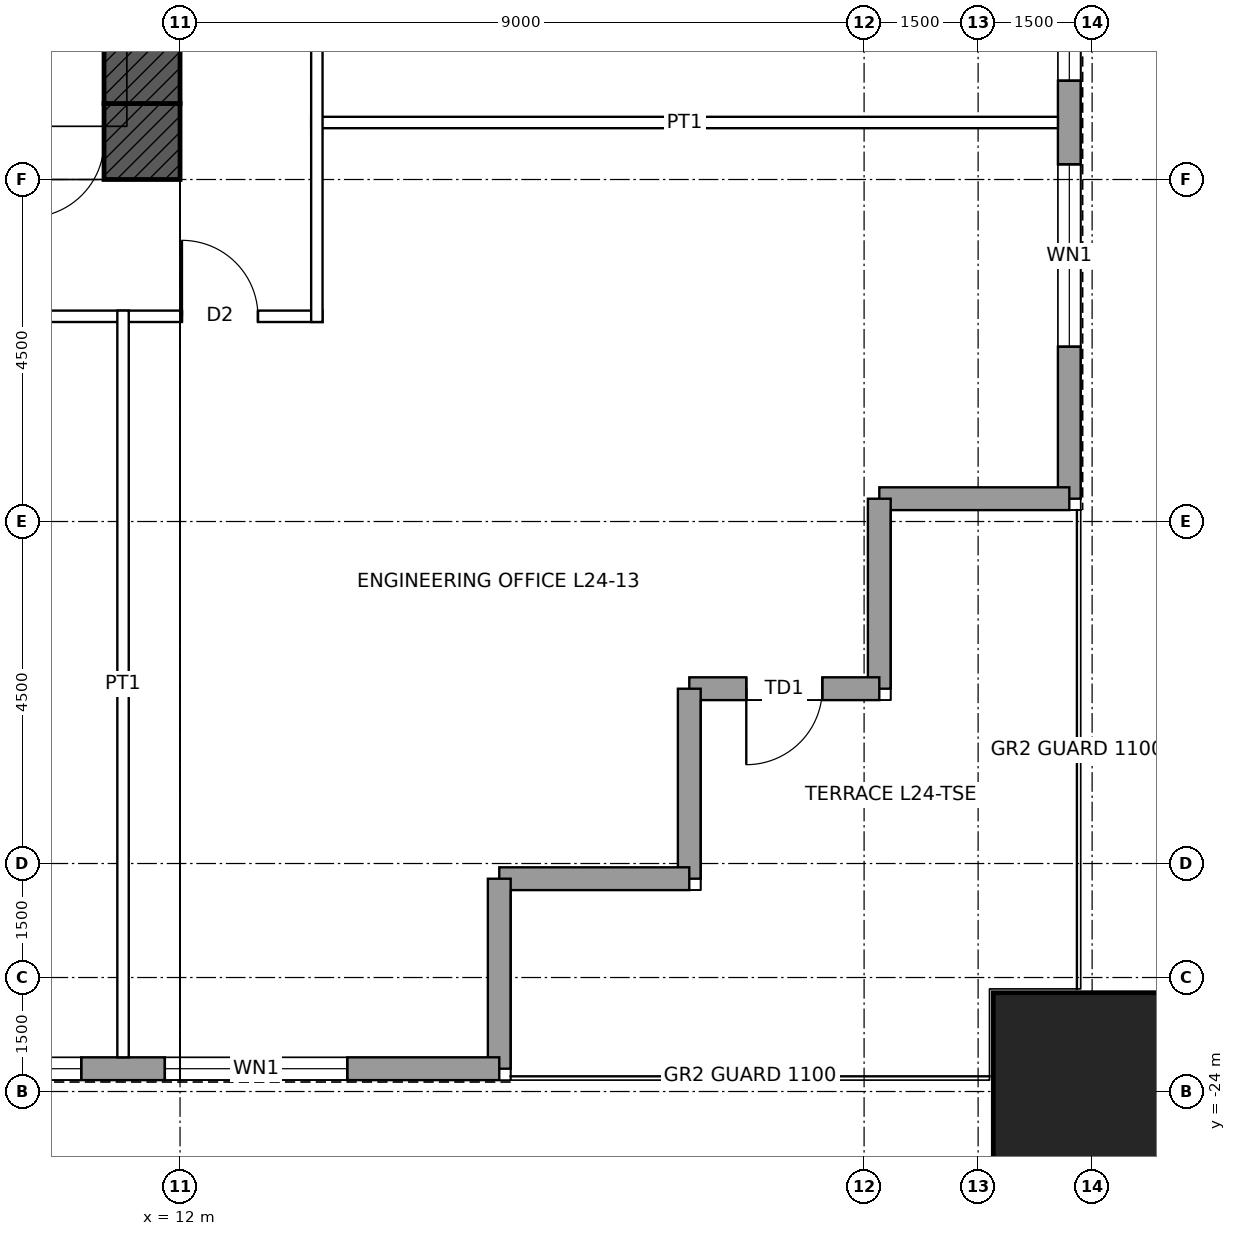
"""IFC4 building model, lengths in metres.
Left out: names, types, materials, properties, quantities, classifications, styles, units other than length and angle.
Written with IfcOpenShell. Run it as: python <this file> out.ifc"""

import sys

from ifc_helpers import new_model, si_unit, direction, frame, frame_2d, origin, origin_2d, place, context, subcontext, project, spatial, rectangle, hollow_rectangle, extrude, element, fill, save


model = new_model("IFC4")
c1 = context("Model", 3, precision=1e-05, world=origin(), true_north=direction((0.0, 1.0)))
c2 = subcontext(c1, "Body", "Model", "MODEL_VIEW")
j1 = project(units=[si_unit("LENGTHUNIT", "METRE"), si_unit("PLANEANGLEUNIT", "RADIAN")], contexts=[c1])
p1 = place(None, origin())
s1 = spatial("IfcSite", under=j1, at=p1, CompositionType="ELEMENT")
p2 = place(p1, origin())
s2 = spatial("IfcBuilding", under=s1, at=p2, CompositionType="ELEMENT")
p3 = place(p2, frame((0.0, 0.0, 122.4)))
s3 = spatial("IfcBuildingStorey", under=s2, at=p3, CompositionType="ELEMENT", Elevation=122.4)
p4 = place(p3, frame((24.0, -24.0, 0.0), z_axis=(0.0, 0.0, 1.0), x_axis=(1.0, 0.0, 0.0)))
e1 = element("IfcColumn", 1, at=p4, inside=s3, PredefinedType="COLUMN", context=c2, shape_type="SweptSolid", body=[
    extrude(hollow_rectangle(XDim=2.6, YDim=2.6, WallThickness=0.13, at=origin_2d()), origin(), (0.0, 0.0, 1.0), 4.5),
])
p5 = place(p3, frame((12.0, -11.5, 0.0), z_axis=(0.0, 0.0, 1.0), x_axis=(-1.0, 0.0, 0.0)))
e2 = element("IfcWall", 2, at=p5, inside=s3, PredefinedType="SHEAR", context=c2, shape_type="SweptSolid", body=[
    extrude(rectangle(XDim=24.0, YDim=1.0, at=frame_2d((12.0, 0.0))), origin(), (0.0, 0.0, 1.0), 4.5),
])
p6 = place(p5, frame((11.5, 0.0, 0.0)))
e3 = element("IfcOpeningElement", 3, at=p6, cuts=e2, PredefinedType="OPENING", context=c2, shape_type="SweptSolid", body=[
    extrude(rectangle(XDim=1.0, YDim=2.1, at=frame_2d((0.5, 1.05))), frame((0.0, 0.51, 0.0), z_axis=(0.0, -1.0, 0.0), x_axis=(1.0, 0.0, 0.0)), (0.0, 0.0, 1.0), 1.02),
])
p7 = place(p5, frame((1.0, 0.0, 0.0)))
e4 = element("IfcOpeningElement", 4, at=p7, cuts=e2, PredefinedType="OPENING", context=c2, shape_type="SweptSolid", body=[
    extrude(rectangle(XDim=1.0, YDim=2.4, at=frame_2d((0.5, 1.2))), frame((0.0, 0.51, 0.0), z_axis=(0.0, -1.0, 0.0), x_axis=(1.0, 0.0, 0.0)), (0.0, 0.0, 1.0), 1.02),
])
p8 = place(p3, frame((11.5, 11.0, 0.0), z_axis=(0.0, 0.0, 1.0), x_axis=(0.0, -1.0, 0.0)))
e5 = element("IfcWall", 5, at=p8, inside=s3, PredefinedType="SHEAR", context=c2, shape_type="SweptSolid", body=[
    extrude(rectangle(XDim=22.0, YDim=1.0, at=frame_2d((11.0, 0.0))), origin(), (0.0, 0.0, 1.0), 4.5),
])
p9 = place(p8, frame((10.5, 0.0, 0.0)))
e6 = element("IfcOpeningElement", 6, at=p9, cuts=e5, PredefinedType="OPENING", context=c2, shape_type="SweptSolid", body=[
    extrude(rectangle(XDim=1.0, YDim=2.4, at=frame_2d((0.5, 1.2))), frame((0.0, 0.51, 0.0), z_axis=(0.0, -1.0, 0.0), x_axis=(1.0, 0.0, 0.0)), (0.0, 0.0, 1.0), 1.02),
])
p10 = place(p3, frame((23.7, 16.2, 0.0), z_axis=(0.0, 0.0, 1.0), x_axis=(0.0, -1.0, 0.0)))
e7 = element("IfcWall", 7, at=p10, inside=s3, PredefinedType="SOLIDWALL", context=c2, shape_type="SweptSolid", body=[
    extrude(rectangle(XDim=32.4, YDim=0.3, at=frame_2d((16.2, 0.0))), origin(), (0.0, 0.0, 1.0), 4.3),
])
p11 = place(p10, frame((2.0, 0.0, 1.0)))
e8 = element("IfcOpeningElement", 8, at=p11, cuts=e7, PredefinedType="OPENING", context=c2, shape_type="SweptSolid", body=[
    extrude(rectangle(XDim=2.4, YDim=1.2, at=frame_2d((1.2, 0.6))), frame((0.0, 0.16, 0.0), z_axis=(0.0, -1.0, 0.0), x_axis=(1.0, 0.0, 0.0)), (0.0, 0.0, 1.0), 0.32),
])
p12 = place(p10, frame((5.5, 0.0, 1.0)))
e9 = element("IfcOpeningElement", 9, at=p12, cuts=e7, PredefinedType="OPENING", context=c2, shape_type="SweptSolid", body=[
    extrude(rectangle(XDim=2.4, YDim=1.2, at=frame_2d((1.2, 0.6))), frame((0.0, 0.16, 0.0), z_axis=(0.0, -1.0, 0.0), x_axis=(1.0, 0.0, 0.0)), (0.0, 0.0, 1.0), 0.32),
])
p13 = place(p10, frame((8.6, 0.0, 1.0)))
e10 = element("IfcOpeningElement", 10, at=p13, cuts=e7, PredefinedType="OPENING", context=c2, shape_type="SweptSolid", body=[
    extrude(rectangle(XDim=2.4, YDim=1.2, at=frame_2d((1.2, 0.6))), frame((0.0, 0.16, 0.0), z_axis=(0.0, -1.0, 0.0), x_axis=(1.0, 0.0, 0.0)), (0.0, 0.0, 1.0), 0.32),
])
p14 = place(p10, frame((13.65, 0.0, 1.0)))
e11 = element("IfcOpeningElement", 11, at=p14, cuts=e7, PredefinedType="OPENING", context=c2, shape_type="SweptSolid", body=[
    extrude(rectangle(XDim=2.4, YDim=1.2, at=frame_2d((1.2, 0.6))), frame((0.0, 0.16, 0.0), z_axis=(0.0, -1.0, 0.0), x_axis=(1.0, 0.0, 0.0)), (0.0, 0.0, 1.0), 0.32),
])
p15 = place(p10, frame((16.35, 0.0, 1.0)))
e12 = element("IfcOpeningElement", 12, at=p15, cuts=e7, PredefinedType="OPENING", context=c2, shape_type="SweptSolid", body=[
    extrude(rectangle(XDim=2.4, YDim=1.2, at=frame_2d((1.2, 0.6))), frame((0.0, 0.16, 0.0), z_axis=(0.0, -1.0, 0.0), x_axis=(1.0, 0.0, 0.0)), (0.0, 0.0, 1.0), 0.32),
])
p16 = place(p10, frame((21.4, 0.0, 1.0)))
e13 = element("IfcOpeningElement", 13, at=p16, cuts=e7, PredefinedType="OPENING", context=c2, shape_type="SweptSolid", body=[
    extrude(rectangle(XDim=2.4, YDim=1.2, at=frame_2d((1.2, 0.6))), frame((0.0, 0.16, 0.0), z_axis=(0.0, -1.0, 0.0), x_axis=(1.0, 0.0, 0.0)), (0.0, 0.0, 1.0), 0.32),
])
p17 = place(p10, frame((24.5, 0.0, 1.0)))
e14 = element("IfcOpeningElement", 14, at=p17, cuts=e7, PredefinedType="OPENING", context=c2, shape_type="SweptSolid", body=[
    extrude(rectangle(XDim=2.4, YDim=1.2, at=frame_2d((1.2, 0.6))), frame((0.0, 0.16, 0.0), z_axis=(0.0, -1.0, 0.0), x_axis=(1.0, 0.0, 0.0)), (0.0, 0.0, 1.0), 0.32),
])
p18 = place(p10, frame((28.0, 0.0, 1.0)))
e15 = element("IfcOpeningElement", 15, at=p18, cuts=e7, PredefinedType="OPENING", context=c2, shape_type="SweptSolid", body=[
    extrude(rectangle(XDim=2.4, YDim=1.2, at=frame_2d((1.2, 0.6))), frame((0.0, 0.16, 0.0), z_axis=(0.0, -1.0, 0.0), x_axis=(1.0, 0.0, 0.0)), (0.0, 0.0, 1.0), 0.32),
])
for number, where, z_axis, x_axis in (
    (16, (23.7, -16.2, 0.0), (0.0, 0.0, 1.0), (-1.0, 0.0, 0.0)),
    (17, (21.2, -16.2, 0.0), (0.0, 0.0, 1.0), (0.0, -1.0, 0.0)),
):
    element("IfcWall", number, at=place(p3, frame(where, z_axis=z_axis, x_axis=x_axis)), inside=s3, PredefinedType="SOLIDWALL", context=c2, shape_type="SweptSolid", body=[
        extrude(rectangle(XDim=2.5, YDim=0.3, at=frame_2d((1.25, 0.0))), origin(), (0.0, 0.0, 1.0), 4.3),
    ])
p19 = place(p3, frame((21.2, -18.7, 0.0), z_axis=(0.0, 0.0, 1.0), x_axis=(-1.0, 0.0, 0.0)))
e18 = element("IfcWall", 18, at=p19, inside=s3, PredefinedType="SOLIDWALL", context=c2, shape_type="SweptSolid", body=[
    extrude(rectangle(XDim=2.5, YDim=0.3, at=frame_2d((1.25, 0.0))), origin(), (0.0, 0.0, 1.0), 4.3),
])
p20 = place(p19, frame((0.75, 0.0, 0.0)))
e19 = element("IfcOpeningElement", 19, at=p20, cuts=e18, PredefinedType="OPENING", context=c2, shape_type="SweptSolid", body=[
    extrude(rectangle(XDim=1.0, YDim=2.4, at=frame_2d((0.5, 1.2))), frame((0.0, 0.16, 0.0), z_axis=(0.0, -1.0, 0.0), x_axis=(1.0, 0.0, 0.0)), (0.0, 0.0, 1.0), 0.32),
])
for number, where, z_axis, x_axis in (
    (20, (18.7, -18.7, 0.0), (0.0, 0.0, 1.0), (0.0, -1.0, 0.0)),
    (21, (18.7, -21.2, 0.0), (0.0, 0.0, 1.0), (-1.0, 0.0, 0.0)),
    (22, (16.2, -21.2, 0.0), (0.0, 0.0, 1.0), (0.0, -1.0, 0.0)),
):
    element("IfcWall", number, at=place(p3, frame(where, z_axis=z_axis, x_axis=x_axis)), inside=s3, PredefinedType="SOLIDWALL", context=c2, shape_type="SweptSolid", body=[
        extrude(rectangle(XDim=2.5, YDim=0.3, at=frame_2d((1.25, 0.0))), origin(), (0.0, 0.0, 1.0), 4.3),
    ])
p21 = place(p3, frame((16.2, -23.7, 0.0), z_axis=(0.0, 0.0, 1.0), x_axis=(-1.0, 0.0, 0.0)))
e23 = element("IfcWall", 23, at=p21, inside=s3, PredefinedType="SOLIDWALL", context=c2, shape_type="SweptSolid", body=[
    extrude(rectangle(XDim=32.4, YDim=0.3, at=frame_2d((16.2, 0.0))), origin(), (0.0, 0.0, 1.0), 4.3),
])
p22 = place(p21, frame((2.0, 0.0, 1.0)))
e24 = element("IfcOpeningElement", 24, at=p22, cuts=e23, PredefinedType="OPENING", context=c2, shape_type="SweptSolid", body=[
    extrude(rectangle(XDim=2.4, YDim=1.2, at=frame_2d((1.2, 0.6))), frame((0.0, 0.16, 0.0), z_axis=(0.0, -1.0, 0.0), x_axis=(1.0, 0.0, 0.0)), (0.0, 0.0, 1.0), 0.32),
])
p23 = place(p21, frame((5.5, 0.0, 1.0)))
e25 = element("IfcOpeningElement", 25, at=p23, cuts=e23, PredefinedType="OPENING", context=c2, shape_type="SweptSolid", body=[
    extrude(rectangle(XDim=2.4, YDim=1.2, at=frame_2d((1.2, 0.6))), frame((0.0, 0.16, 0.0), z_axis=(0.0, -1.0, 0.0), x_axis=(1.0, 0.0, 0.0)), (0.0, 0.0, 1.0), 0.32),
])
p24 = place(p21, frame((8.6, 0.0, 1.0)))
e26 = element("IfcOpeningElement", 26, at=p24, cuts=e23, PredefinedType="OPENING", context=c2, shape_type="SweptSolid", body=[
    extrude(rectangle(XDim=2.4, YDim=1.2, at=frame_2d((1.2, 0.6))), frame((0.0, 0.16, 0.0), z_axis=(0.0, -1.0, 0.0), x_axis=(1.0, 0.0, 0.0)), (0.0, 0.0, 1.0), 0.32),
])
p25 = place(p21, frame((13.65, 0.0, 1.0)))
e27 = element("IfcOpeningElement", 27, at=p25, cuts=e23, PredefinedType="OPENING", context=c2, shape_type="SweptSolid", body=[
    extrude(rectangle(XDim=2.4, YDim=1.2, at=frame_2d((1.2, 0.6))), frame((0.0, 0.16, 0.0), z_axis=(0.0, -1.0, 0.0), x_axis=(1.0, 0.0, 0.0)), (0.0, 0.0, 1.0), 0.32),
])
p26 = place(p21, frame((16.35, 0.0, 1.0)))
e28 = element("IfcOpeningElement", 28, at=p26, cuts=e23, PredefinedType="OPENING", context=c2, shape_type="SweptSolid", body=[
    extrude(rectangle(XDim=2.4, YDim=1.2, at=frame_2d((1.2, 0.6))), frame((0.0, 0.16, 0.0), z_axis=(0.0, -1.0, 0.0), x_axis=(1.0, 0.0, 0.0)), (0.0, 0.0, 1.0), 0.32),
])
p27 = place(p21, frame((21.4, 0.0, 1.0)))
e29 = element("IfcOpeningElement", 29, at=p27, cuts=e23, PredefinedType="OPENING", context=c2, shape_type="SweptSolid", body=[
    extrude(rectangle(XDim=2.4, YDim=1.2, at=frame_2d((1.2, 0.6))), frame((0.0, 0.16, 0.0), z_axis=(0.0, -1.0, 0.0), x_axis=(1.0, 0.0, 0.0)), (0.0, 0.0, 1.0), 0.32),
])
p28 = place(p21, frame((24.5, 0.0, 1.0)))
e30 = element("IfcOpeningElement", 30, at=p28, cuts=e23, PredefinedType="OPENING", context=c2, shape_type="SweptSolid", body=[
    extrude(rectangle(XDim=2.4, YDim=1.2, at=frame_2d((1.2, 0.6))), frame((0.0, 0.16, 0.0), z_axis=(0.0, -1.0, 0.0), x_axis=(1.0, 0.0, 0.0)), (0.0, 0.0, 1.0), 0.32),
])
p29 = place(p21, frame((28.0, 0.0, 1.0)))
e31 = element("IfcOpeningElement", 31, at=p29, cuts=e23, PredefinedType="OPENING", context=c2, shape_type="SweptSolid", body=[
    extrude(rectangle(XDim=2.4, YDim=1.2, at=frame_2d((1.2, 0.6))), frame((0.0, 0.16, 0.0), z_axis=(0.0, -1.0, 0.0), x_axis=(1.0, 0.0, 0.0)), (0.0, 0.0, 1.0), 0.32),
])
p30 = place(p3, frame((-13.875, -13.8, 0.0), z_axis=(0.0, 0.0, 1.0), x_axis=(1.0, 0.0, 0.0)))
e32 = element("IfcWall", 32, at=p30, inside=s3, PredefinedType="PARTITIONING", context=c2, shape_type="SweptSolid", body=[
    extrude(rectangle(XDim=27.75, YDim=0.15, at=frame_2d((13.875, 0.0))), origin(), (0.0, 0.0, 1.0), 4.3),
])
p31 = place(p30, frame((20.475, 0.0, 0.0)))
e33 = element("IfcOpeningElement", 33, at=p31, cuts=e32, PredefinedType="OPENING", context=c2, shape_type="SweptSolid", body=[
    extrude(rectangle(XDim=1.8, YDim=2.4, at=frame_2d((0.9, 1.2))), frame((0.0, 0.085, 0.0), z_axis=(0.0, -1.0, 0.0), x_axis=(1.0, 0.0, 0.0)), (0.0, 0.0, 1.0), 0.17),
])
p32 = place(p30, frame((10.525, 0.0, 0.0)))
e34 = element("IfcOpeningElement", 34, at=p32, cuts=e32, PredefinedType="OPENING", context=c2, shape_type="SweptSolid", body=[
    extrude(rectangle(XDim=1.8, YDim=2.4, at=frame_2d((0.9, 1.2))), frame((0.0, 0.085, 0.0), z_axis=(0.0, -1.0, 0.0), x_axis=(1.0, 0.0, 0.0)), (0.0, 0.0, 1.0), 0.17),
])
p33 = place(p30, frame((5.475, 0.0, 0.0)))
e35 = element("IfcOpeningElement", 35, at=p33, cuts=e32, PredefinedType="OPENING", context=c2, shape_type="SweptSolid", body=[
    extrude(rectangle(XDim=1.8, YDim=2.4, at=frame_2d((0.9, 1.2))), frame((0.0, 0.085, 0.0), z_axis=(0.0, -1.0, 0.0), x_axis=(1.0, 0.0, 0.0)), (0.0, 0.0, 1.0), 0.17),
])
p34 = place(p30, frame((25.9, 0.0, 0.0)))
e36 = element("IfcOpeningElement", 36, at=p34, cuts=e32, PredefinedType="OPENING", context=c2, shape_type="SweptSolid", body=[
    extrude(rectangle(XDim=1.0, YDim=2.1, at=frame_2d((0.5, 1.05))), frame((0.0, 0.085, 0.0), z_axis=(0.0, -1.0, 0.0), x_axis=(1.0, 0.0, 0.0)), (0.0, 0.0, 1.0), 0.17),
])
p35 = place(p30, frame((0.85, 0.0, 0.0)))
e37 = element("IfcOpeningElement", 37, at=p35, cuts=e32, PredefinedType="OPENING", context=c2, shape_type="SweptSolid", body=[
    extrude(rectangle(XDim=1.0, YDim=2.1, at=frame_2d((0.5, 1.05))), frame((0.0, 0.085, 0.0), z_axis=(0.0, -1.0, 0.0), x_axis=(1.0, 0.0, 0.0)), (0.0, 0.0, 1.0), 0.17),
])
for number, where, z_axis, x_axis in (
    (38, (13.725, -11.25, 0.0), (0.0, 0.0, 1.0), (1.0, 0.0, 0.0)),
    (39, (11.25, -23.55, 0.0), (0.0, 0.0, 1.0), (0.0, 1.0, 0.0)),
):
    element("IfcWall", number, at=place(p3, frame(where, z_axis=z_axis, x_axis=x_axis)), inside=s3, PredefinedType="PARTITIONING", context=c2, shape_type="SweptSolid", body=[
        extrude(rectangle(XDim=9.825, YDim=0.15, at=frame_2d((4.913, 0.0))), origin(), (0.0, 0.0, 1.0), 3.431),
    ])
p36 = place(p3, frame((13.8, -13.875, 0.0), z_axis=(0.0, 0.0, 1.0), x_axis=(0.0, 1.0, 0.0)))
e40 = element("IfcWall", 40, at=p36, inside=s3, PredefinedType="PARTITIONING", context=c2, shape_type="SweptSolid", body=[
    extrude(rectangle(XDim=27.75, YDim=0.15, at=frame_2d((13.875, 0.0))), origin(), (0.0, 0.0, 1.0), 4.3),
])
p37 = place(p36, frame((20.875, 0.0, 0.0)))
e41 = element("IfcOpeningElement", 41, at=p37, cuts=e40, PredefinedType="OPENING", context=c2, shape_type="SweptSolid", body=[
    extrude(rectangle(XDim=1.0, YDim=2.1, at=frame_2d((0.5, 1.05))), frame((0.0, 0.085, 0.0), z_axis=(0.0, -1.0, 0.0), x_axis=(1.0, 0.0, 0.0)), (0.0, 0.0, 1.0), 0.17),
])
p38 = place(p36, frame((9.225, 0.0, 0.0)))
e42 = element("IfcOpeningElement", 42, at=p38, cuts=e40, PredefinedType="OPENING", context=c2, shape_type="SweptSolid", body=[
    extrude(rectangle(XDim=1.8, YDim=2.4, at=frame_2d((0.9, 1.2))), frame((0.0, 0.085, 0.0), z_axis=(0.0, -1.0, 0.0), x_axis=(1.0, 0.0, 0.0)), (0.0, 0.0, 1.0), 0.17),
])
p39 = place(p17, origin())
e43 = element("IfcWindow", 43, at=p39, inside=s3, PartitioningType="SINGLE_PANEL", PredefinedType="WINDOW", context=c2, shape_type="SweptSolid", body=[
    extrude(rectangle(XDim=2.4, YDim=1.2, at=frame_2d((1.2, 0.6))), frame((0.0, 0.03, 0.0), z_axis=(0.0, -1.0, 0.0), x_axis=(1.0, 0.0, 0.0)), (0.0, 0.0, 1.0), 0.06),
])
fill(e14, e43)
p40 = place(p18, origin())
e44 = element("IfcWindow", 44, at=p40, inside=s3, PartitioningType="SINGLE_PANEL", PredefinedType="WINDOW", context=c2, shape_type="SweptSolid", body=[
    extrude(rectangle(XDim=2.4, YDim=1.2, at=frame_2d((1.2, 0.6))), frame((0.0, 0.03, 0.0), z_axis=(0.0, -1.0, 0.0), x_axis=(1.0, 0.0, 0.0)), (0.0, 0.0, 1.0), 0.06),
])
fill(e15, e44)
p41 = place(p20, origin())
e45 = element("IfcDoor", 45, at=p41, inside=s3, OperationType="SINGLE_SWING_RIGHT", PredefinedType="DOOR", context=c2, shape_type="SweptSolid", body=[
    extrude(rectangle(XDim=1.0, YDim=2.4, at=frame_2d((0.5, 1.2))), frame((0.0, 0.025, 0.0), z_axis=(0.0, -1.0, 0.0), x_axis=(1.0, 0.0, 0.0)), (0.0, 0.0, 1.0), 0.05),
])
fill(e19, e45)
p42 = place(p22, origin())
e46 = element("IfcWindow", 46, at=p42, inside=s3, PartitioningType="SINGLE_PANEL", PredefinedType="WINDOW", context=c2, shape_type="SweptSolid", body=[
    extrude(rectangle(XDim=2.4, YDim=1.2, at=frame_2d((1.2, 0.6))), frame((0.0, 0.03, 0.0), z_axis=(0.0, -1.0, 0.0), x_axis=(1.0, 0.0, 0.0)), (0.0, 0.0, 1.0), 0.06),
])
fill(e24, e46)
p43 = place(p23, origin())
e47 = element("IfcWindow", 47, at=p43, inside=s3, PartitioningType="SINGLE_PANEL", PredefinedType="WINDOW", context=c2, shape_type="SweptSolid", body=[
    extrude(rectangle(XDim=2.4, YDim=1.2, at=frame_2d((1.2, 0.6))), frame((0.0, 0.03, 0.0), z_axis=(0.0, -1.0, 0.0), x_axis=(1.0, 0.0, 0.0)), (0.0, 0.0, 1.0), 0.06),
])
fill(e25, e47)
p44 = place(p7, origin())
e48 = element("IfcDoor", 48, at=p44, inside=s3, OperationType="SINGLE_SWING_RIGHT", PredefinedType="DOOR", context=c2, shape_type="SweptSolid", body=[
    extrude(rectangle(XDim=1.0, YDim=2.4, at=frame_2d((0.5, 1.2))), frame((0.0, 0.485, 0.0), z_axis=(0.0, -1.0, 0.0), x_axis=(1.0, 0.0, 0.0)), (0.0, 0.0, 1.0), 0.05),
])
fill(e4, e48)
p45 = place(p34, origin())
e49 = element("IfcDoor", 49, at=p45, inside=s3, OperationType="SINGLE_SWING_LEFT", PredefinedType="DOOR", context=c2, shape_type="SweptSolid", body=[
    extrude(rectangle(XDim=1.0, YDim=2.1, at=frame_2d((0.5, 1.05))), frame((0.0, 0.025, 0.0), z_axis=(0.0, -1.0, 0.0), x_axis=(1.0, 0.0, 0.0)), (0.0, 0.0, 1.0), 0.05),
])
fill(e36, e49)
save(model, sys.argv[1])
